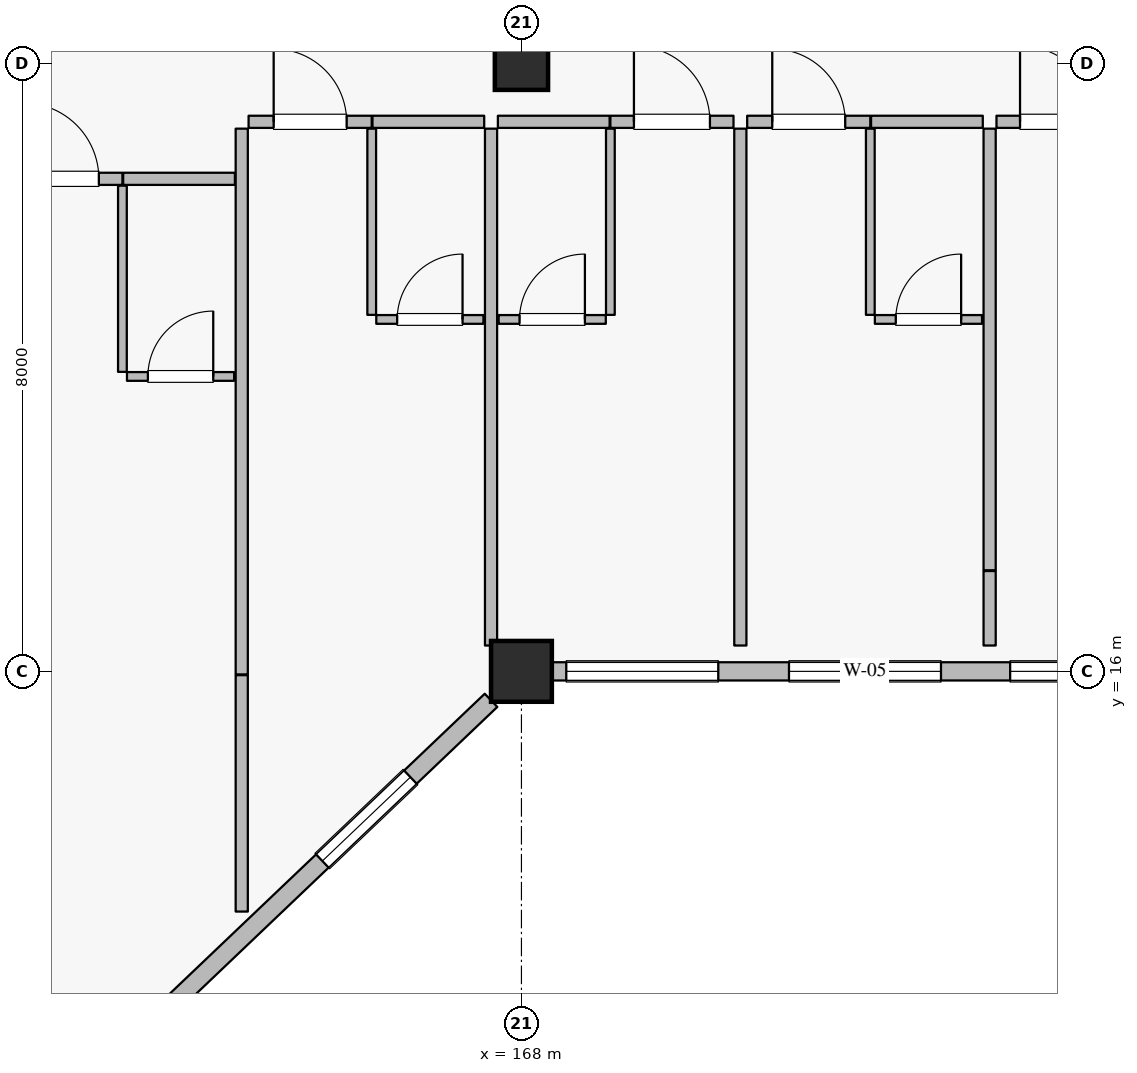
"""IFC4 building model, lengths in metres.
Left out: names, types, materials, properties, quantities, classifications, styles, units other than length and angle.
Written with IfcOpenShell. Run it as: python <this file> out.ifc"""

import sys

from ifc_helpers import new_model, si_unit, direction, frame, frame_2d, origin, origin_2d, place, context, subcontext, project, spatial, rectangle, extrude, element, fill, save


model = new_model("IFC4")
c1 = context("Model", 3, precision=1e-05, world=origin(), true_north=direction((0.0, 1.0)))
c2 = subcontext(c1, "Body", "Model", "MODEL_VIEW")
j1 = project(units=[si_unit("LENGTHUNIT", "METRE"), si_unit("PLANEANGLEUNIT", "RADIAN")], contexts=[c1])
p1 = place(None, origin())
s1 = spatial("IfcSite", under=j1, at=p1, CompositionType="ELEMENT")
p2 = place(p1, origin())
s2 = spatial("IfcBuilding", under=s1, at=p2, CompositionType="ELEMENT")
p3 = place(p2, frame((0.0, 0.0, 16.2)))
s3 = spatial("IfcBuildingStorey", under=s2, at=p3, CompositionType="ELEMENT", Elevation=16.2)
p4 = place(p3, frame((168.0, 16.0, 0.0), z_axis=(0.0, 0.0, 1.0), x_axis=(1.0, 0.0, 0.0)))
e1 = element("IfcColumn", 1, at=p4, inside=s3, PredefinedType="COLUMN", context=c2, shape_type="SweptSolid", body=[
    extrude(rectangle(XDim=0.8, YDim=0.8, at=origin_2d()), origin(), (0.0, 0.0, 1.0), 4.8),
])
p5 = place(p3, frame((168.0, 24.0, 0.0), z_axis=(0.0, 0.0, 1.0), x_axis=(1.0, 0.0, 0.0)))
e2 = element("IfcColumn", 2, at=p5, inside=s3, PredefinedType="COLUMN", context=c2, shape_type="SweptSolid", body=[
    extrude(rectangle(XDim=0.7, YDim=0.7, at=origin_2d()), origin(), (0.0, 0.0, 1.0), 4.8),
])
p6 = place(p3, frame((167.6, 15.619, 0.0), z_axis=(0.0, 0.0, 1.0), x_axis=(-0.724156739794, -0.689635422677, 0.0)))
e3 = element("IfcWall", 3, at=p6, inside=s3, PredefinedType="SOLIDWALL", context=c2, shape_type="SweptSolid", body=[
    extrude(rectangle(XDim=10.495, YDim=0.24, at=frame_2d((5.248, 0.0))), origin(), (0.0, 0.0, 1.0), 4.13),
])
p7 = place(p6, frame((1.465, 0.0, 0.8)))
e4 = element("IfcOpeningElement", 4, at=p7, cuts=e3, PredefinedType="OPENING", context=c2, shape_type="SweptSolid", body=[
    extrude(rectangle(XDim=1.6, YDim=1.6, at=frame_2d((0.8, 0.8))), frame((0.0, 0.13, 0.0), z_axis=(0.0, -1.0, 0.0), x_axis=(1.0, 0.0, 0.0)), (0.0, 0.0, 1.0), 0.26),
])
p8 = place(p6, frame((5.994, 0.0, 0.8)))
e5 = element("IfcOpeningElement", 5, at=p8, cuts=e3, PredefinedType="OPENING", context=c2, shape_type="SweptSolid", body=[
    extrude(rectangle(XDim=1.6, YDim=1.6, at=frame_2d((0.8, 0.8))), frame((0.0, 0.13, 0.0), z_axis=(0.0, -1.0, 0.0), x_axis=(1.0, 0.0, 0.0)), (0.0, 0.0, 1.0), 0.26),
])
p9 = place(p3, frame((176.0, 16.0, 0.0), z_axis=(0.0, 0.0, 1.0), x_axis=(-1.0, 0.0, 0.0)))
e6 = element("IfcWall", 6, at=p9, inside=s3, PredefinedType="SOLIDWALL", context=c2, shape_type="SweptSolid", body=[
    extrude(rectangle(XDim=7.6, YDim=0.24, at=frame_2d((3.8, 0.0))), origin(), (0.0, 0.0, 1.0), 4.13),
])
p10 = place(p9, frame((0.17, 0.0, 0.8)))
e7 = element("IfcOpeningElement", 7, at=p10, cuts=e6, PredefinedType="OPENING", context=c2, shape_type="SweptSolid", body=[
    extrude(rectangle(XDim=1.4, YDim=1.6, at=frame_2d((0.7, 0.8))), frame((0.0, 0.13, 0.0), z_axis=(0.0, -1.0, 0.0), x_axis=(1.0, 0.0, 0.0)), (0.0, 0.0, 1.0), 0.26),
])
p11 = place(p9, frame((2.48, 0.0, 0.8)))
e8 = element("IfcOpeningElement", 8, at=p11, cuts=e6, PredefinedType="OPENING", context=c2, shape_type="SweptSolid", body=[
    extrude(rectangle(XDim=2.0, YDim=1.75, at=frame_2d((1.0, 0.875))), frame((0.0, 0.13, 0.0), z_axis=(0.0, -1.0, 0.0), x_axis=(1.0, 0.0, 0.0)), (0.0, 0.0, 1.0), 0.26),
])
p12 = place(p9, frame((5.41, 0.0, 0.8)))
e9 = element("IfcOpeningElement", 9, at=p12, cuts=e6, PredefinedType="OPENING", context=c2, shape_type="SweptSolid", body=[
    extrude(rectangle(XDim=2.0, YDim=1.75, at=frame_2d((1.0, 0.875))), frame((0.0, 0.13, 0.0), z_axis=(0.0, -1.0, 0.0), x_axis=(1.0, 0.0, 0.0)), (0.0, 0.0, 1.0), 0.26),
])
p13 = place(p3, frame((161.13, 22.48, 0.0), z_axis=(0.0, 0.0, 1.0), x_axis=(1.0, 0.0, 0.0)))
e10 = element("IfcWall", 10, at=p13, inside=s3, PredefinedType="PARTITIONING", context=c2, shape_type="SweptSolid", body=[
    extrude(rectangle(XDim=1.62, YDim=0.16, at=frame_2d((0.81, 0.0))), origin(), (0.0, 0.0, 1.0), 4.535),
])
p14 = place(p13, frame((0.31, 0.0, 0.0)))
e11 = element("IfcOpeningElement", 11, at=p14, cuts=e10, PredefinedType="OPENING", context=c2, shape_type="SweptSolid", body=[
    extrude(rectangle(XDim=1.0, YDim=2.25, at=frame_2d((0.5, 1.125))), frame((0.0, 0.09, 0.0), z_axis=(0.0, -1.0, 0.0), x_axis=(1.0, 0.0, 0.0)), (0.0, 0.0, 1.0), 0.18),
])
p15 = place(p3, frame((162.76, 22.48, 0.0), z_axis=(0.0, 0.0, 1.0), x_axis=(1.0, 0.0, 0.0)))
e12 = element("IfcWall", 12, at=p15, inside=s3, PredefinedType="PARTITIONING", context=c2, shape_type="SweptSolid", body=[
    extrude(rectangle(XDim=1.47, YDim=0.16, at=frame_2d((0.735, 0.0))), origin(), (0.0, 0.0, 1.0), 4.535),
])
p16 = place(p3, frame((162.75, 19.94, 0.0), z_axis=(0.0, 0.0, 1.0), x_axis=(0.0, 1.0, 0.0)))
e13 = element("IfcWall", 13, at=p16, inside=s3, PredefinedType="PARTITIONING", context=c2, shape_type="SweptSolid", body=[
    extrude(rectangle(XDim=2.45, YDim=0.115, at=frame_2d((1.225, 0.0))), origin(), (0.0, 0.0, 1.0), 4.535),
])
p17 = place(p3, frame((162.81, 19.88, 0.0), z_axis=(0.0, 0.0, 1.0), x_axis=(1.0, 0.0, 0.0)))
e14 = element("IfcWall", 14, at=p17, inside=s3, PredefinedType="PARTITIONING", context=c2, shape_type="SweptSolid", body=[
    extrude(rectangle(XDim=1.41, YDim=0.115, at=frame_2d((0.705, 0.0))), origin(), (0.0, 0.0, 1.0), 4.535),
])
p18 = place(p17, frame((0.275, 0.0, 0.0)))
e15 = element("IfcOpeningElement", 15, at=p18, cuts=e14, PredefinedType="OPENING", context=c2, shape_type="SweptSolid", body=[
    extrude(rectangle(XDim=0.86, YDim=2.12, at=frame_2d((0.43, 1.06))), frame((0.0, 0.067, 0.0), z_axis=(0.0, -1.0, 0.0), x_axis=(1.0, 0.0, 0.0)), (0.0, 0.0, 1.0), 0.135),
])
p19 = place(p3, frame((164.32, 12.84, 0.0), z_axis=(0.0, 0.0, 1.0), x_axis=(0.0, 1.0, 0.0)))
e16 = element("IfcWall", 16, at=p19, inside=s3, PredefinedType="PARTITIONING", context=c2, shape_type="SweptSolid", body=[
    extrude(rectangle(XDim=3.11, YDim=0.16, at=frame_2d((1.555, 0.0))), origin(), (0.0, 0.0, 1.0), 4.535),
])
p20 = place(p3, frame((164.41, 23.23, 0.0), z_axis=(0.0, 0.0, 1.0), x_axis=(1.0, 0.0, 0.0)))
e17 = element("IfcWall", 17, at=p20, inside=s3, PredefinedType="PARTITIONING", context=c2, shape_type="SweptSolid", body=[
    extrude(rectangle(XDim=1.62, YDim=0.16, at=frame_2d((0.81, 0.0))), origin(), (0.0, 0.0, 1.0), 4.535),
])
p21 = place(p20, frame((0.33, 0.0, 0.0)))
e18 = element("IfcOpeningElement", 18, at=p21, cuts=e17, PredefinedType="OPENING", context=c2, shape_type="SweptSolid", body=[
    extrude(rectangle(XDim=0.96, YDim=2.2, at=frame_2d((0.48, 1.1))), frame((0.0, 0.09, 0.0), z_axis=(0.0, -1.0, 0.0), x_axis=(1.0, 0.0, 0.0)), (0.0, 0.0, 1.0), 0.18),
])
p22 = place(p3, frame((166.04, 23.23, 0.0), z_axis=(0.0, 0.0, 1.0), x_axis=(1.0, 0.0, 0.0)))
e19 = element("IfcWall", 19, at=p22, inside=s3, PredefinedType="PARTITIONING", context=c2, shape_type="SweptSolid", body=[
    extrude(rectangle(XDim=1.47, YDim=0.16, at=frame_2d((0.735, 0.0))), origin(), (0.0, 0.0, 1.0), 4.535),
])
p23 = place(p3, frame((166.03, 20.69, 0.0), z_axis=(0.0, 0.0, 1.0), x_axis=(0.0, 1.0, 0.0)))
e20 = element("IfcWall", 20, at=p23, inside=s3, PredefinedType="PARTITIONING", context=c2, shape_type="SweptSolid", body=[
    extrude(rectangle(XDim=2.45, YDim=0.115, at=frame_2d((1.225, 0.0))), origin(), (0.0, 0.0, 1.0), 4.535),
])
p24 = place(p3, frame((166.09, 20.63, 0.0), z_axis=(0.0, 0.0, 1.0), x_axis=(1.0, 0.0, 0.0)))
e21 = element("IfcWall", 21, at=p24, inside=s3, PredefinedType="PARTITIONING", context=c2, shape_type="SweptSolid", body=[
    extrude(rectangle(XDim=1.41, YDim=0.115, at=frame_2d((0.705, 0.0))), origin(), (0.0, 0.0, 1.0), 4.535),
])
p25 = place(p24, frame((0.275, 0.0, 0.0)))
e22 = element("IfcOpeningElement", 22, at=p25, cuts=e21, PredefinedType="OPENING", context=c2, shape_type="SweptSolid", body=[
    extrude(rectangle(XDim=0.86, YDim=2.12, at=frame_2d((0.43, 1.06))), frame((0.0, 0.067, 0.0), z_axis=(0.0, -1.0, 0.0), x_axis=(1.0, 0.0, 0.0)), (0.0, 0.0, 1.0), 0.135),
])
p26 = place(p3, frame((164.32, 15.96, 0.0), z_axis=(0.0, 0.0, 1.0), x_axis=(0.0, 1.0, 0.0)))
e23 = element("IfcWall", 23, at=p26, inside=s3, PredefinedType="PARTITIONING", context=c2, shape_type="SweptSolid", body=[
    extrude(rectangle(XDim=7.18, YDim=0.16, at=frame_2d((3.59, 0.0))), origin(), (0.0, 0.0, 1.0), 4.535),
])
p27 = place(p3, frame((167.69, 23.23, 0.0), z_axis=(0.0, 0.0, 1.0), x_axis=(1.0, 0.0, 0.0)))
e24 = element("IfcWall", 24, at=p27, inside=s3, PredefinedType="PARTITIONING", context=c2, shape_type="SweptSolid", body=[
    extrude(rectangle(XDim=1.47, YDim=0.16, at=frame_2d((0.735, 0.0))), origin(), (0.0, 0.0, 1.0), 4.535),
])
p28 = place(p3, frame((169.17, 23.23, 0.0), z_axis=(0.0, 0.0, 1.0), x_axis=(1.0, 0.0, 0.0)))
e25 = element("IfcWall", 25, at=p28, inside=s3, PredefinedType="PARTITIONING", context=c2, shape_type="SweptSolid", body=[
    extrude(rectangle(XDim=1.62, YDim=0.16, at=frame_2d((0.81, 0.0))), origin(), (0.0, 0.0, 1.0), 4.535),
])
p29 = place(p28, frame((0.31, 0.0, 0.0)))
e26 = element("IfcOpeningElement", 26, at=p29, cuts=e25, PredefinedType="OPENING", context=c2, shape_type="SweptSolid", body=[
    extrude(rectangle(XDim=1.0, YDim=2.25, at=frame_2d((0.5, 1.125))), frame((0.0, 0.09, 0.0), z_axis=(0.0, -1.0, 0.0), x_axis=(1.0, 0.0, 0.0)), (0.0, 0.0, 1.0), 0.18),
])
p30 = place(p3, frame((169.17, 20.69, 0.0), z_axis=(0.0, 0.0, 1.0), x_axis=(0.0, 1.0, 0.0)))
e27 = element("IfcWall", 27, at=p30, inside=s3, PredefinedType="PARTITIONING", context=c2, shape_type="SweptSolid", body=[
    extrude(rectangle(XDim=2.45, YDim=0.115, at=frame_2d((1.225, 0.0))), origin(), (0.0, 0.0, 1.0), 4.535),
])
p31 = place(p3, frame((167.7, 20.63, 0.0), z_axis=(0.0, 0.0, 1.0), x_axis=(1.0, 0.0, 0.0)))
e28 = element("IfcWall", 28, at=p31, inside=s3, PredefinedType="PARTITIONING", context=c2, shape_type="SweptSolid", body=[
    extrude(rectangle(XDim=1.41, YDim=0.115, at=frame_2d((0.705, 0.0))), origin(), (0.0, 0.0, 1.0), 4.535),
])
p32 = place(p31, frame((0.275, 0.0, 0.0)))
e29 = element("IfcOpeningElement", 29, at=p32, cuts=e28, PredefinedType="OPENING", context=c2, shape_type="SweptSolid", body=[
    extrude(rectangle(XDim=0.86, YDim=2.12, at=frame_2d((0.43, 1.06))), frame((0.0, 0.067, 0.0), z_axis=(0.0, -1.0, 0.0), x_axis=(1.0, 0.0, 0.0)), (0.0, 0.0, 1.0), 0.135),
])
p33 = place(p3, frame((167.6, 16.34, 0.0), z_axis=(0.0, 0.0, 1.0), x_axis=(0.0, 1.0, 0.0)))
e30 = element("IfcWall", 30, at=p33, inside=s3, PredefinedType="PARTITIONING", context=c2, shape_type="SweptSolid", body=[
    extrude(rectangle(XDim=6.8, YDim=0.16, at=frame_2d((3.4, 0.0))), origin(), (0.0, 0.0, 1.0), 4.535),
])
p34 = place(p3, frame((170.97, 23.23, 0.0), z_axis=(0.0, 0.0, 1.0), x_axis=(1.0, 0.0, 0.0)))
e31 = element("IfcWall", 31, at=p34, inside=s3, PredefinedType="PARTITIONING", context=c2, shape_type="SweptSolid", body=[
    extrude(rectangle(XDim=1.62, YDim=0.16, at=frame_2d((0.81, 0.0))), origin(), (0.0, 0.0, 1.0), 4.535),
])
p35 = place(p34, frame((0.33, 0.0, 0.0)))
e32 = element("IfcOpeningElement", 32, at=p35, cuts=e31, PredefinedType="OPENING", context=c2, shape_type="SweptSolid", body=[
    extrude(rectangle(XDim=0.96, YDim=2.2, at=frame_2d((0.48, 1.1))), frame((0.0, 0.09, 0.0), z_axis=(0.0, -1.0, 0.0), x_axis=(1.0, 0.0, 0.0)), (0.0, 0.0, 1.0), 0.18),
])
p36 = place(p3, frame((172.6, 23.23, 0.0), z_axis=(0.0, 0.0, 1.0), x_axis=(1.0, 0.0, 0.0)))
e33 = element("IfcWall", 33, at=p36, inside=s3, PredefinedType="PARTITIONING", context=c2, shape_type="SweptSolid", body=[
    extrude(rectangle(XDim=1.47, YDim=0.16, at=frame_2d((0.735, 0.0))), origin(), (0.0, 0.0, 1.0), 4.535),
])
p37 = place(p3, frame((172.59, 20.69, 0.0), z_axis=(0.0, 0.0, 1.0), x_axis=(0.0, 1.0, 0.0)))
e34 = element("IfcWall", 34, at=p37, inside=s3, PredefinedType="PARTITIONING", context=c2, shape_type="SweptSolid", body=[
    extrude(rectangle(XDim=2.45, YDim=0.115, at=frame_2d((1.225, 0.0))), origin(), (0.0, 0.0, 1.0), 4.535),
])
p38 = place(p3, frame((172.65, 20.63, 0.0), z_axis=(0.0, 0.0, 1.0), x_axis=(1.0, 0.0, 0.0)))
e35 = element("IfcWall", 35, at=p38, inside=s3, PredefinedType="PARTITIONING", context=c2, shape_type="SweptSolid", body=[
    extrude(rectangle(XDim=1.41, YDim=0.115, at=frame_2d((0.705, 0.0))), origin(), (0.0, 0.0, 1.0), 4.535),
])
p39 = place(p38, frame((0.275, 0.0, 0.0)))
e36 = element("IfcOpeningElement", 36, at=p39, cuts=e35, PredefinedType="OPENING", context=c2, shape_type="SweptSolid", body=[
    extrude(rectangle(XDim=0.86, YDim=2.12, at=frame_2d((0.43, 1.06))), frame((0.0, 0.067, 0.0), z_axis=(0.0, -1.0, 0.0), x_axis=(1.0, 0.0, 0.0)), (0.0, 0.0, 1.0), 0.135),
])
p40 = place(p3, frame((170.88, 16.34, 0.0), z_axis=(0.0, 0.0, 1.0), x_axis=(0.0, 1.0, 0.0)))
e37 = element("IfcWall", 37, at=p40, inside=s3, PredefinedType="PARTITIONING", context=c2, shape_type="SweptSolid", body=[
    extrude(rectangle(XDim=6.8, YDim=0.16, at=frame_2d((3.4, 0.0))), origin(), (0.0, 0.0, 1.0), 4.535),
])
p41 = place(p3, frame((174.16, 16.34, 0.0), z_axis=(0.0, 0.0, 1.0), x_axis=(0.0, 1.0, 0.0)))
e38 = element("IfcWall", 38, at=p41, inside=s3, PredefinedType="PARTITIONING", context=c2, shape_type="SweptSolid", body=[
    extrude(rectangle(XDim=0.98, YDim=0.16, at=frame_2d((0.49, 0.0))), origin(), (0.0, 0.0, 1.0), 4.535),
])
p42 = place(p3, frame((174.25, 23.23, 0.0), z_axis=(0.0, 0.0, 1.0), x_axis=(1.0, 0.0, 0.0)))
e39 = element("IfcWall", 39, at=p42, inside=s3, PredefinedType="PARTITIONING", context=c2, shape_type="SweptSolid", body=[
    extrude(rectangle(XDim=1.62, YDim=0.16, at=frame_2d((0.81, 0.0))), origin(), (0.0, 0.0, 1.0), 4.535),
])
p43 = place(p42, frame((0.31, 0.0, 0.0)))
e40 = element("IfcOpeningElement", 40, at=p43, cuts=e39, PredefinedType="OPENING", context=c2, shape_type="SweptSolid", body=[
    extrude(rectangle(XDim=1.0, YDim=2.25, at=frame_2d((0.5, 1.125))), frame((0.0, 0.09, 0.0), z_axis=(0.0, -1.0, 0.0), x_axis=(1.0, 0.0, 0.0)), (0.0, 0.0, 1.0), 0.18),
])
p44 = place(p3, frame((174.16, 17.33, 0.0), z_axis=(0.0, 0.0, 1.0), x_axis=(0.0, 1.0, 0.0)))
e41 = element("IfcWall", 41, at=p44, inside=s3, PredefinedType="PARTITIONING", context=c2, shape_type="SweptSolid", body=[
    extrude(rectangle(XDim=5.81, YDim=0.16, at=frame_2d((2.905, 0.0))), origin(), (0.0, 0.0, 1.0), 4.535),
])
p45 = place(p7, origin())
e42 = element("IfcWindow", 42, at=p45, inside=s3, PartitioningType="SINGLE_PANEL", PredefinedType="WINDOW", context=c2, shape_type="SweptSolid", body=[
    extrude(rectangle(XDim=1.6, YDim=1.6, at=frame_2d((0.8, 0.8))), frame((0.0, 0.03, 0.0), z_axis=(0.0, -1.0, 0.0), x_axis=(1.0, 0.0, 0.0)), (0.0, 0.0, 1.0), 0.06),
])
fill(e4, e42)
p46 = place(p10, origin())
e43 = element("IfcWindow", 43, at=p46, inside=s3, PartitioningType="SINGLE_PANEL", PredefinedType="WINDOW", context=c2, shape_type="SweptSolid", body=[
    extrude(rectangle(XDim=1.4, YDim=1.6, at=frame_2d((0.7, 0.8))), frame((0.0, 0.03, 0.0), z_axis=(0.0, -1.0, 0.0), x_axis=(1.0, 0.0, 0.0)), (0.0, 0.0, 1.0), 0.06),
])
fill(e7, e43)
p47 = place(p11, origin())
e44 = element("IfcWindow", 44, at=p47, inside=s3, PartitioningType="DOUBLE_PANEL_VERTICAL", PredefinedType="WINDOW", context=c2, shape_type="SweptSolid", body=[
    extrude(rectangle(XDim=2.0, YDim=1.75, at=frame_2d((1.0, 0.875))), frame((0.0, 0.03, 0.0), z_axis=(0.0, -1.0, 0.0), x_axis=(1.0, 0.0, 0.0)), (0.0, 0.0, 1.0), 0.06),
])
fill(e8, e44)
p48 = place(p12, origin())
e45 = element("IfcWindow", 45, at=p48, inside=s3, PartitioningType="DOUBLE_PANEL_VERTICAL", PredefinedType="WINDOW", context=c2, shape_type="SweptSolid", body=[
    extrude(rectangle(XDim=2.0, YDim=1.75, at=frame_2d((1.0, 0.875))), frame((0.0, 0.03, 0.0), z_axis=(0.0, -1.0, 0.0), x_axis=(1.0, 0.0, 0.0)), (0.0, 0.0, 1.0), 0.06),
])
fill(e9, e45)
p49 = place(p14, origin())
e46 = element("IfcDoor", 46, at=p49, inside=s3, OperationType="SINGLE_SWING_LEFT", PredefinedType="DOOR", context=c2, shape_type="SweptSolid", body=[
    extrude(rectangle(XDim=1.0, YDim=2.25, at=frame_2d((0.5, 1.125))), frame((0.0, 0.025, 0.0), z_axis=(0.0, -1.0, 0.0), x_axis=(1.0, 0.0, 0.0)), (0.0, 0.0, 1.0), 0.05),
])
fill(e11, e46)
p50 = place(p18, origin())
e47 = element("IfcDoor", 47, at=p50, inside=s3, OperationType="SINGLE_SWING_RIGHT", PredefinedType="DOOR", context=c2, shape_type="SweptSolid", body=[
    extrude(rectangle(XDim=0.86, YDim=2.12, at=frame_2d((0.43, 1.06))), frame((0.0, 0.025, 0.0), z_axis=(0.0, -1.0, 0.0), x_axis=(1.0, 0.0, 0.0)), (0.0, 0.0, 1.0), 0.05),
])
fill(e15, e47)
p51 = place(p21, origin())
e48 = element("IfcDoor", 48, at=p51, inside=s3, OperationType="SINGLE_SWING_LEFT", PredefinedType="DOOR", context=c2, shape_type="SweptSolid", body=[
    extrude(rectangle(XDim=0.96, YDim=2.2, at=frame_2d((0.48, 1.1))), frame((0.0, 0.025, 0.0), z_axis=(0.0, -1.0, 0.0), x_axis=(1.0, 0.0, 0.0)), (0.0, 0.0, 1.0), 0.05),
])
fill(e18, e48)
p52 = place(p25, origin())
e49 = element("IfcDoor", 49, at=p52, inside=s3, OperationType="SINGLE_SWING_RIGHT", PredefinedType="DOOR", context=c2, shape_type="SweptSolid", body=[
    extrude(rectangle(XDim=0.86, YDim=2.12, at=frame_2d((0.43, 1.06))), frame((0.0, 0.025, 0.0), z_axis=(0.0, -1.0, 0.0), x_axis=(1.0, 0.0, 0.0)), (0.0, 0.0, 1.0), 0.05),
])
fill(e22, e49)
p53 = place(p29, origin())
e50 = element("IfcDoor", 50, at=p53, inside=s3, OperationType="SINGLE_SWING_LEFT", PredefinedType="DOOR", context=c2, shape_type="SweptSolid", body=[
    extrude(rectangle(XDim=1.0, YDim=2.25, at=frame_2d((0.5, 1.125))), frame((0.0, 0.025, 0.0), z_axis=(0.0, -1.0, 0.0), x_axis=(1.0, 0.0, 0.0)), (0.0, 0.0, 1.0), 0.05),
])
fill(e26, e50)
p54 = place(p32, origin())
e51 = element("IfcDoor", 51, at=p54, inside=s3, OperationType="SINGLE_SWING_RIGHT", PredefinedType="DOOR", context=c2, shape_type="SweptSolid", body=[
    extrude(rectangle(XDim=0.86, YDim=2.12, at=frame_2d((0.43, 1.06))), frame((0.0, 0.025, 0.0), z_axis=(0.0, -1.0, 0.0), x_axis=(1.0, 0.0, 0.0)), (0.0, 0.0, 1.0), 0.05),
])
fill(e29, e51)
p55 = place(p35, origin())
e52 = element("IfcDoor", 52, at=p55, inside=s3, OperationType="SINGLE_SWING_LEFT", PredefinedType="DOOR", context=c2, shape_type="SweptSolid", body=[
    extrude(rectangle(XDim=0.96, YDim=2.2, at=frame_2d((0.48, 1.1))), frame((0.0, 0.025, 0.0), z_axis=(0.0, -1.0, 0.0), x_axis=(1.0, 0.0, 0.0)), (0.0, 0.0, 1.0), 0.05),
])
fill(e32, e52)
p56 = place(p39, origin())
e53 = element("IfcDoor", 53, at=p56, inside=s3, OperationType="SINGLE_SWING_RIGHT", PredefinedType="DOOR", context=c2, shape_type="SweptSolid", body=[
    extrude(rectangle(XDim=0.86, YDim=2.12, at=frame_2d((0.43, 1.06))), frame((0.0, 0.025, 0.0), z_axis=(0.0, -1.0, 0.0), x_axis=(1.0, 0.0, 0.0)), (0.0, 0.0, 1.0), 0.05),
])
fill(e36, e53)
p57 = place(p43, origin())
e54 = element("IfcDoor", 54, at=p57, inside=s3, OperationType="SINGLE_SWING_LEFT", PredefinedType="DOOR", context=c2, shape_type="SweptSolid", body=[
    extrude(rectangle(XDim=1.0, YDim=2.25, at=frame_2d((0.5, 1.125))), frame((0.0, 0.025, 0.0), z_axis=(0.0, -1.0, 0.0), x_axis=(1.0, 0.0, 0.0)), (0.0, 0.0, 1.0), 0.05),
])
fill(e40, e54)
save(model, sys.argv[1])
